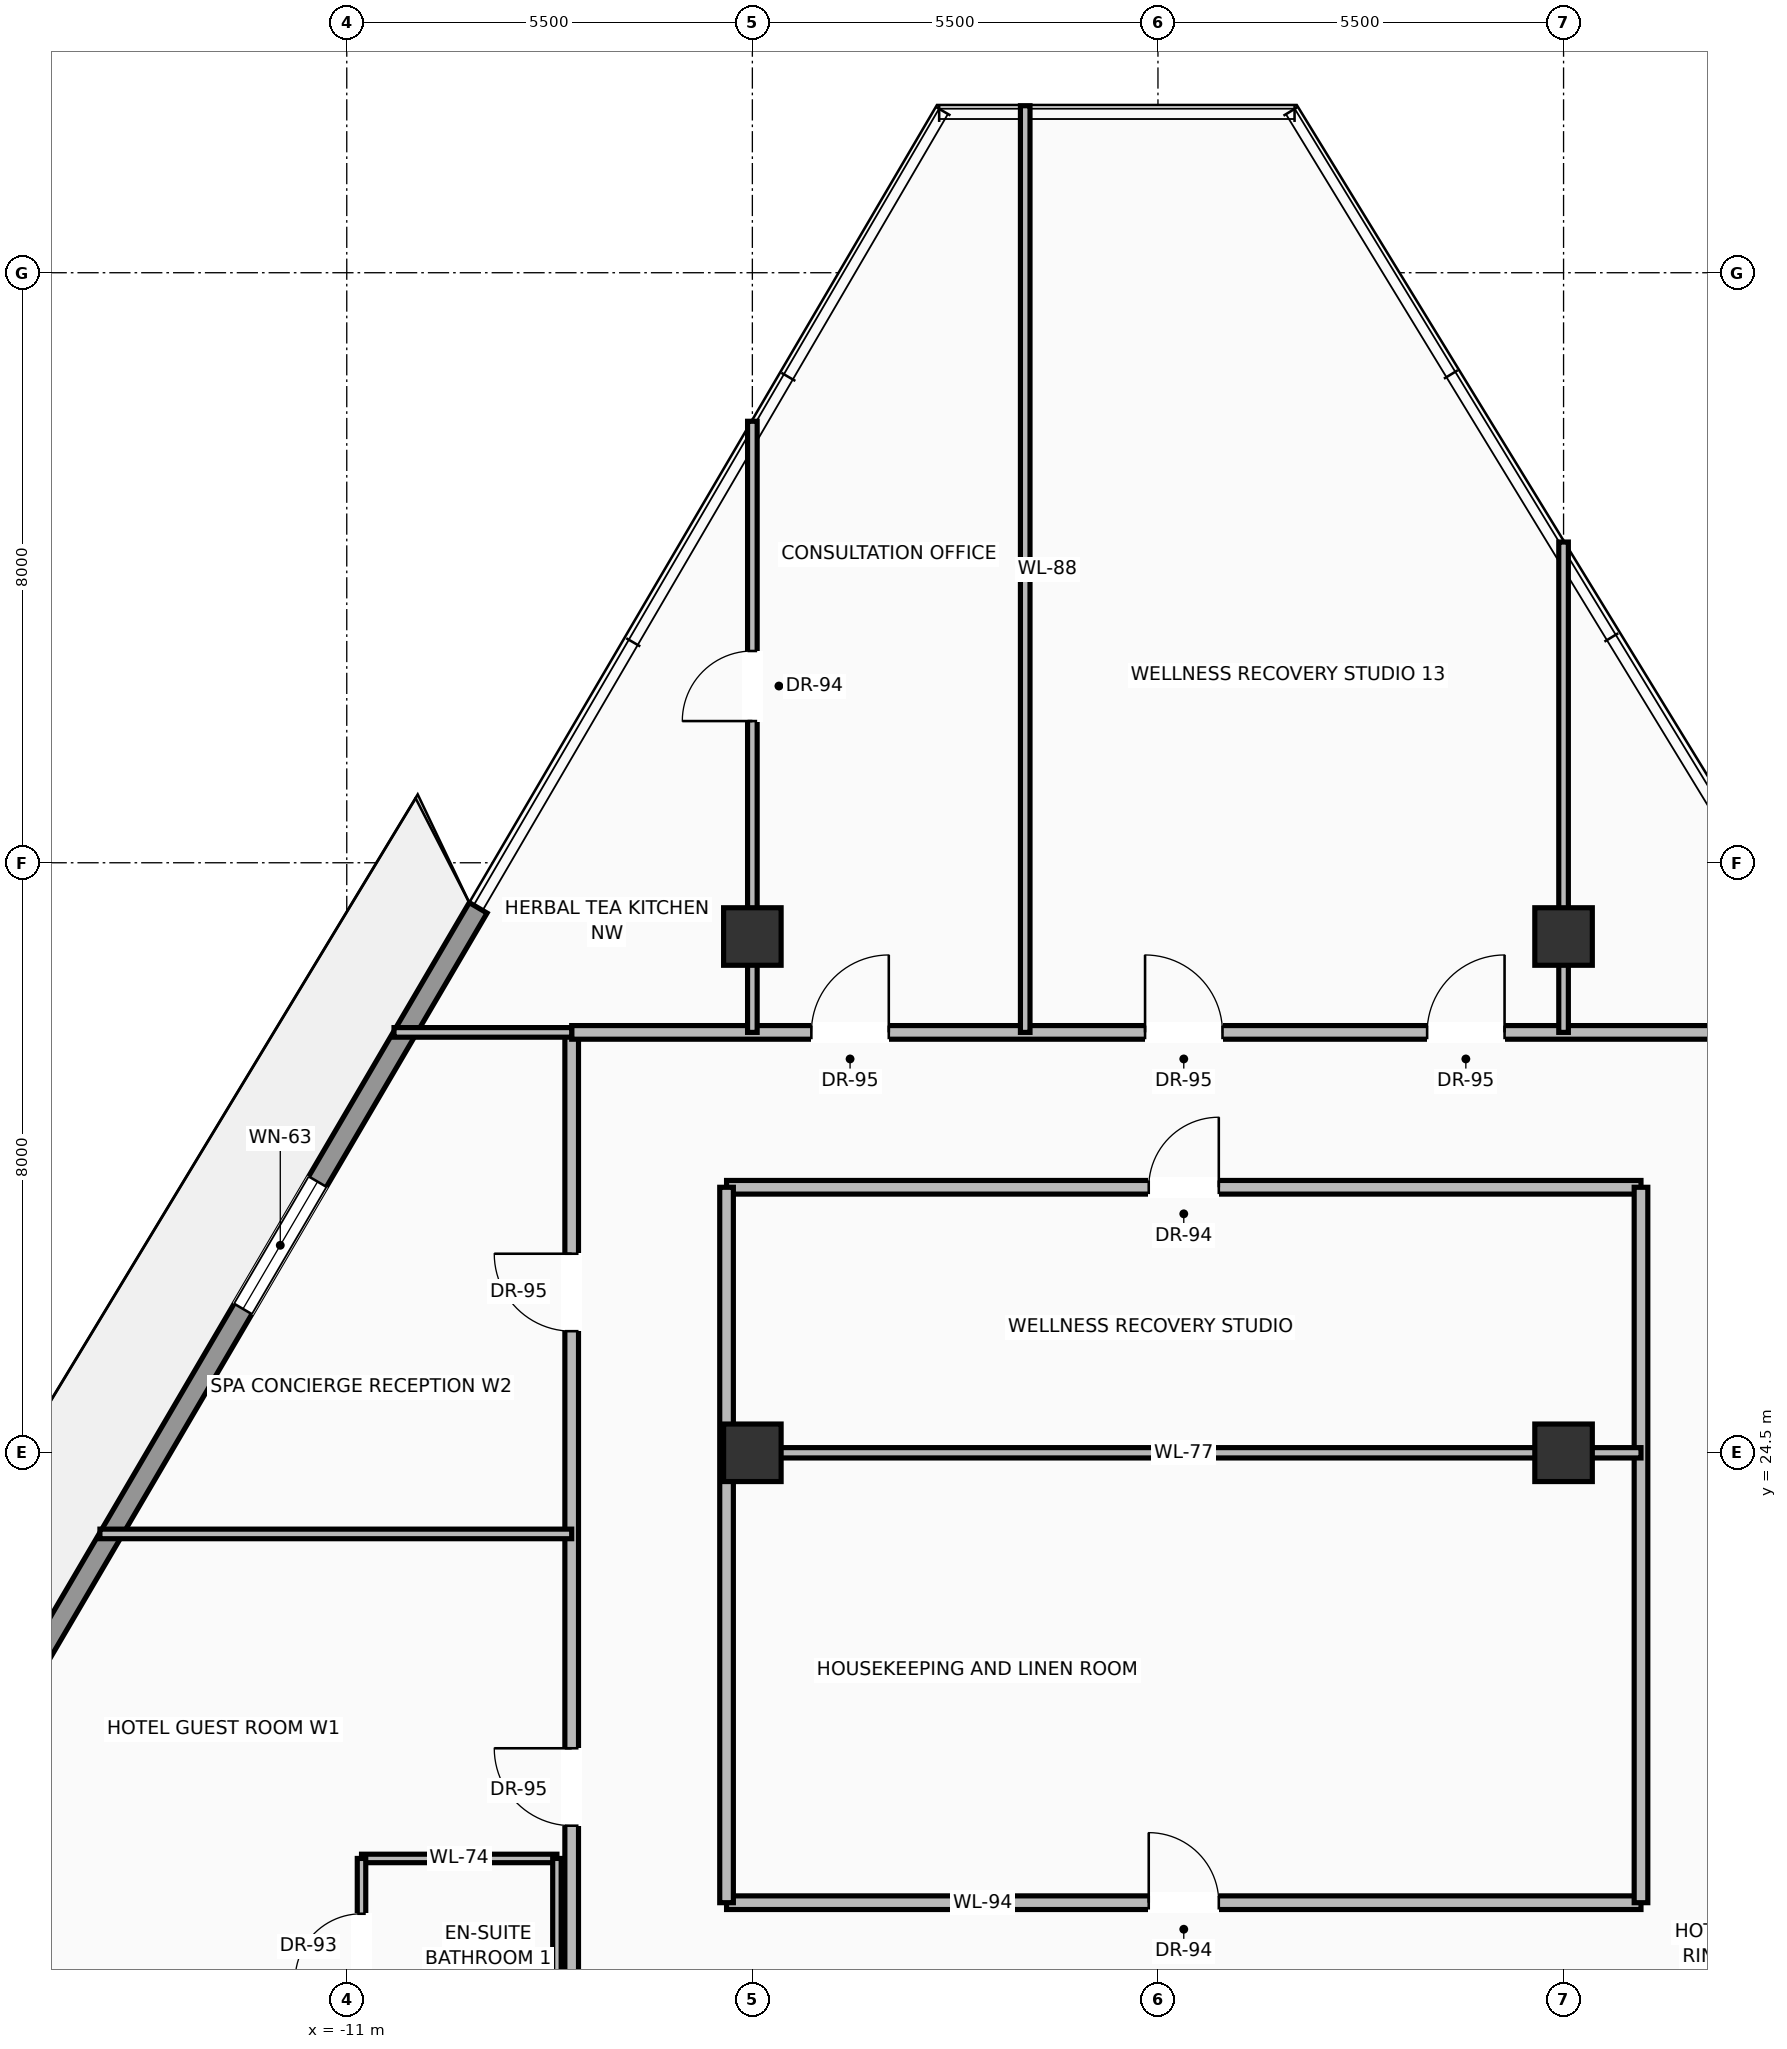
"""IFC4 building model, lengths in metres.
Left out: names, types, materials, properties, quantities, classifications, styles, units other than length and angle.
Written with IfcOpenShell. Run it as: python <this file> out.ifc"""

import sys

from ifc_helpers import new_model, si_unit, direction, frame, frame_2d, origin, origin_2d, place, context, subcontext, project, spatial, rectangle, extrude, source, transform, mapped, element, fill, save


model = new_model("IFC4")
c1 = context("Model", 3, precision=1e-05, world=origin(), true_north=direction((0.0, 1.0)))
c2 = subcontext(c1, "Body", "Model", "MODEL_VIEW")
j1 = project(units=[si_unit("LENGTHUNIT", "METRE"), si_unit("PLANEANGLEUNIT", "RADIAN")], contexts=[c1])
p1 = place(None, origin())
s1 = spatial("IfcSite", under=j1, at=p1, CompositionType="ELEMENT")
p2 = place(p1, origin())
s2 = spatial("IfcBuilding", under=s1, at=p2, CompositionType="ELEMENT")
p3 = place(p2, frame((0.0, 0.0, 247.6)))
s3 = spatial("IfcBuildingStorey", under=s2, at=p3, CompositionType="ELEMENT", Elevation=247.6)
m1 = source(origin(), c2, "Body", "SweptSolid", [
    extrude(rectangle(XDim=0.78, YDim=0.78, at=origin_2d()), origin(), (0.0, 0.0, 1.0), 3.45),
])
for number, where, z_axis, x_axis in (
    (1, (-5.5, 24.5, 0.0), (0.0, 0.0, 1.0), (1.0, 0.0, 0.0)),
    (2, (5.5, 24.5, 0.0), (0.0, 0.0, 1.0), (1.0, 0.0, 0.0)),
    (3, (-5.5, 31.5, 0.0), (0.0, 0.0, 1.0), (1.0, 0.0, 0.0)),
    (4, (5.5, 31.5, 0.0), (0.0, 0.0, 1.0), (1.0, 0.0, 0.0)),
):
    element("IfcColumn", number, at=place(p3, frame(where, z_axis=z_axis, x_axis=x_axis)), inside=s3, PredefinedType="COLUMN", context=c2, shape_type="MappedRepresentation", body=[
        mapped(m1, transform((0.0, 0.0, 0.0), scale=1.0)),
    ])
p4 = place(p3, frame((-19.184, 14.895, 0.0), z_axis=(0.0, 0.0, 1.0), x_axis=(0.505884551296, 0.862601194504, 0.0)))
e5 = element("IfcWall", 5, at=p4, inside=s3, PredefinedType="SOLIDWALL", context=c2, shape_type="SweptSolid", body=[
    extrude(rectangle(XDim=19.701, YDim=0.28, at=frame_2d((9.85, 0.0))), origin(), (0.0, 0.0, 1.0), 2.82),
])
p5 = place(p4, frame((4.728, 0.0, 0.0)))
e6 = element("IfcOpeningElement", 6, at=p5, cuts=e5, PredefinedType="OPENING", context=c2, shape_type="SweptSolid", body=[
    extrude(rectangle(XDim=1.6, YDim=2.35, at=frame_2d((0.8, 1.175))), frame((0.0, 0.15, 0.0), z_axis=(0.0, -1.0, 0.0), x_axis=(1.0, 0.0, 0.0)), (0.0, 0.0, 1.0), 0.3),
])
p6 = place(p4, frame((13.396, 0.0, 0.9)))
e7 = element("IfcOpeningElement", 7, at=p6, cuts=e5, PredefinedType="OPENING", context=c2, shape_type="SweptSolid", body=[
    extrude(rectangle(XDim=2.0, YDim=1.75, at=frame_2d((1.0, 0.875))), frame((0.0, 0.15, 0.0), z_axis=(0.0, -1.0, 0.0), x_axis=(1.0, 0.0, 0.0)), (0.0, 0.0, 1.0), 0.3),
])
p7 = place(p3, frame((-5.85, 18.4, 0.0), z_axis=(0.0, 0.0, 1.0), x_axis=(1.0, 0.0, 0.0)))
e8 = element("IfcWall", 8, at=p7, inside=s3, PredefinedType="PARTITIONING", context=c2, shape_type="SweptSolid", body=[
    extrude(rectangle(XDim=12.4, YDim=0.185, at=frame_2d((6.2, 0.0))), origin(), (0.0, 0.0, 1.0), 3.232),
])
p8 = place(p7, frame((5.725, 0.0, 0.0)))
e9 = element("IfcOpeningElement", 9, at=p8, cuts=e8, PredefinedType="OPENING", context=c2, shape_type="SweptSolid", body=[
    extrude(rectangle(XDim=0.95, YDim=2.2, at=frame_2d((0.475, 1.1))), frame((0.0, 0.103, 0.0), z_axis=(0.0, -1.0, 0.0), x_axis=(1.0, 0.0, 0.0)), (0.0, 0.0, 1.0), 0.205),
])
p9 = place(p3, frame((-5.85, 28.1, 0.0), z_axis=(0.0, 0.0, 1.0), x_axis=(1.0, 0.0, 0.0)))
e10 = element("IfcWall", 10, at=p9, inside=s3, PredefinedType="PARTITIONING", context=c2, shape_type="SweptSolid", body=[
    extrude(rectangle(XDim=12.4, YDim=0.185, at=frame_2d((6.2, 0.0))), origin(), (0.0, 0.0, 1.0), 2.885),
])
p10 = place(p9, frame((5.725, 0.0, 0.0)))
e11 = element("IfcOpeningElement", 11, at=p10, cuts=e10, PredefinedType="OPENING", context=c2, shape_type="SweptSolid", body=[
    extrude(rectangle(XDim=0.95, YDim=2.2, at=frame_2d((0.475, 1.1))), frame((0.0, 0.103, 0.0), z_axis=(0.0, -1.0, 0.0), x_axis=(1.0, 0.0, 0.0)), (0.0, 0.0, 1.0), 0.205),
])
for number, where, z_axis, x_axis in (
    (12, (-5.85, 18.4, 0.0), (0.0, 0.0, 1.0), (0.0, 1.0, 0.0)),
    (13, (6.55, 18.4, 0.0), (0.0, 0.0, 1.0), (0.0, 1.0, 0.0)),
):
    element("IfcWall", number, at=place(p3, frame(where, z_axis=z_axis, x_axis=x_axis)), inside=s3, PredefinedType="PARTITIONING", context=c2, shape_type="SweptSolid", body=[
        extrude(rectangle(XDim=9.7, YDim=0.185, at=frame_2d((4.85, 0.0))), origin(), (0.0, 0.0, 1.0), 3.232),
    ])
p11 = place(p3, frame((-7.95, 16.3, 0.0), z_axis=(0.0, 0.0, 1.0), x_axis=(0.0, 1.0, 0.0)))
e14 = element("IfcWall", 14, at=p11, inside=s3, PredefinedType="PARTITIONING", context=c2, shape_type="SweptSolid", body=[
    extrude(rectangle(XDim=13.9, YDim=0.185, at=frame_2d((6.95, 0.0))), origin(), (0.0, 0.0, 1.0), 3.232),
])
p12 = place(p11, frame((3.144, 0.0, 0.0)))
e15 = element("IfcOpeningElement", 15, at=p12, cuts=e14, PredefinedType="OPENING", context=c2, shape_type="SweptSolid", body=[
    extrude(rectangle(XDim=1.05, YDim=2.25, at=frame_2d((0.525, 1.125))), frame((0.0, 0.103, 0.0), z_axis=(0.0, -1.0, 0.0), x_axis=(1.0, 0.0, 0.0)), (0.0, 0.0, 1.0), 0.205),
])
p13 = place(p11, frame((9.849, 0.0, 0.0)))
e16 = element("IfcOpeningElement", 16, at=p13, cuts=e14, PredefinedType="OPENING", context=c2, shape_type="SweptSolid", body=[
    extrude(rectangle(XDim=1.05, YDim=2.25, at=frame_2d((0.525, 1.125))), frame((0.0, 0.103, 0.0), z_axis=(0.0, -1.0, 0.0), x_axis=(1.0, 0.0, 0.0)), (0.0, 0.0, 1.0), 0.205),
])
p14 = place(p3, frame((-7.95, 30.2, 0.0), z_axis=(0.0, 0.0, 1.0), x_axis=(1.0, 0.0, 0.0)))
e17 = element("IfcWall", 17, at=p14, inside=s3, PredefinedType="PARTITIONING", context=c2, shape_type="SweptSolid", body=[
    extrude(rectangle(XDim=16.6, YDim=0.185, at=frame_2d((8.3, 0.0))), origin(), (0.0, 0.0, 1.0), 3.232),
])
p15 = place(p14, frame((3.25, 0.0, 0.0)))
e18 = element("IfcOpeningElement", 18, at=p15, cuts=e17, PredefinedType="OPENING", context=c2, shape_type="SweptSolid", body=[
    extrude(rectangle(XDim=1.05, YDim=2.25, at=frame_2d((0.525, 1.125))), frame((0.0, 0.103, 0.0), z_axis=(0.0, -1.0, 0.0), x_axis=(1.0, 0.0, 0.0)), (0.0, 0.0, 1.0), 0.205),
])
p16 = place(p14, frame((7.775, 0.0, 0.0)))
e19 = element("IfcOpeningElement", 19, at=p16, cuts=e17, PredefinedType="OPENING", context=c2, shape_type="SweptSolid", body=[
    extrude(rectangle(XDim=1.05, YDim=2.25, at=frame_2d((0.525, 1.125))), frame((0.0, 0.103, 0.0), z_axis=(0.0, -1.0, 0.0), x_axis=(1.0, 0.0, 0.0)), (0.0, 0.0, 1.0), 0.205),
])
p17 = place(p14, frame((11.6, 0.0, 0.0)))
e20 = element("IfcOpeningElement", 20, at=p17, cuts=e17, PredefinedType="OPENING", context=c2, shape_type="SweptSolid", body=[
    extrude(rectangle(XDim=1.05, YDim=2.25, at=frame_2d((0.525, 1.125))), frame((0.0, 0.103, 0.0), z_axis=(0.0, -1.0, 0.0), x_axis=(1.0, 0.0, 0.0)), (0.0, 0.0, 1.0), 0.205),
])
p18 = place(p3, frame((-5.85, 24.5, 0.0), z_axis=(0.0, 0.0, 1.0), x_axis=(1.0, 0.0, 0.0)))
e21 = element("IfcWall", 21, at=p18, inside=s3, PredefinedType="PARTITIONING", context=c2, shape_type="SweptSolid", body=[
    extrude(rectangle(XDim=12.4, YDim=0.14, at=frame_2d((6.2, 0.0))), origin(), (0.0, 0.0, 1.0), 2.683),
])
p19 = place(p3, frame((-10.359, 30.2, 0.0), z_axis=(0.0, 0.0, 1.0), x_axis=(1.0, 0.0, 0.0)))
e22 = element("IfcWall", 22, at=p19, inside=s3, PredefinedType="PARTITIONING", context=c2, shape_type="SweptSolid", body=[
    extrude(rectangle(XDim=2.409, YDim=0.13, at=frame_2d((1.205, 0.0))), origin(), (0.0, 0.0, 1.0), 3.232),
])
p20 = place(p3, frame((-5.5, 30.2, 0.0), z_axis=(0.0, 0.0, 1.0), x_axis=(0.0, 1.0, 0.0)))
e23 = element("IfcWall", 23, at=p20, inside=s3, PredefinedType="PARTITIONING", context=c2, shape_type="SweptSolid", body=[
    extrude(rectangle(XDim=8.286, YDim=0.13, at=frame_2d((4.143, 0.0))), origin(), (0.0, 0.0, 1.0), 2.683),
])
p21 = place(p20, frame((4.221, 0.0, 0.0)))
e24 = element("IfcOpeningElement", 24, at=p21, cuts=e23, PredefinedType="OPENING", context=c2, shape_type="SweptSolid", body=[
    extrude(rectangle(XDim=0.95, YDim=2.2, at=frame_2d((0.475, 1.1))), frame((0.0, 0.075, 0.0), z_axis=(0.0, -1.0, 0.0), x_axis=(1.0, 0.0, 0.0)), (0.0, 0.0, 1.0), 0.15),
])
p22 = place(p3, frame((5.5, 30.2, 0.0), z_axis=(0.0, 0.0, 1.0), x_axis=(0.0, 1.0, 0.0)))
e25 = element("IfcWall", 25, at=p22, inside=s3, PredefinedType="PARTITIONING", context=c2, shape_type="SweptSolid", body=[
    extrude(rectangle(XDim=6.649, YDim=0.13, at=frame_2d((3.324, 0.0))), origin(), (0.0, 0.0, 1.0), 2.683),
])
p23 = place(p3, frame((-1.8, 30.2, 0.0), z_axis=(0.0, 0.0, 1.0), x_axis=(0.0, 1.0, 0.0)))
e26 = element("IfcWall", 26, at=p23, inside=s3, PredefinedType="PARTITIONING", context=c2, shape_type="SweptSolid", body=[
    extrude(rectangle(XDim=12.564, YDim=0.13, at=frame_2d((6.282, 0.0))), origin(), (0.0, 0.0, 1.0), 3.232),
])
p24 = place(p3, frame((-10.8, 19.0, 0.0), z_axis=(0.0, 0.0, 1.0), x_axis=(1.0, 0.0, 0.0)))
e27 = element("IfcWall", 27, at=p24, inside=s3, PredefinedType="PARTITIONING", context=c2, shape_type="SweptSolid", body=[
    extrude(rectangle(XDim=2.65, YDim=0.115, at=frame_2d((1.325, 0.0))), origin(), (0.0, 0.0, 1.0), 3.232),
])
p25 = place(p3, frame((-10.8, 16.6, 0.0), z_axis=(0.0, 0.0, 1.0), x_axis=(0.0, 1.0, 0.0)))
e28 = element("IfcWall", 28, at=p25, inside=s3, PredefinedType="PARTITIONING", context=c2, shape_type="SweptSolid", body=[
    extrude(rectangle(XDim=2.4, YDim=0.115, at=frame_2d((1.2, 0.0))), origin(), (0.0, 0.0, 1.0), 3.232),
])
p26 = place(p25, frame((0.75, 0.0, 0.0)))
e29 = element("IfcOpeningElement", 29, at=p26, cuts=e28, PredefinedType="OPENING", context=c2, shape_type="SweptSolid", body=[
    extrude(rectangle(XDim=0.9, YDim=2.15, at=frame_2d((0.45, 1.075))), frame((0.0, 0.067, 0.0), z_axis=(0.0, -1.0, 0.0), x_axis=(1.0, 0.0, 0.0)), (0.0, 0.0, 1.0), 0.135),
])
p27 = place(p3, frame((-8.15, 16.6, 0.0), z_axis=(0.0, 0.0, 1.0), x_axis=(0.0, 1.0, 0.0)))
e30 = element("IfcWall", 30, at=p27, inside=s3, PredefinedType="PARTITIONING", context=c2, shape_type="SweptSolid", body=[
    extrude(rectangle(XDim=2.4, YDim=0.115, at=frame_2d((1.2, 0.0))), origin(), (0.0, 0.0, 1.0), 3.232),
])
p28 = place(p3, frame((-14.347, 23.4, 0.0), z_axis=(0.0, 0.0, 1.0), x_axis=(1.0, 0.0, 0.0)))
e31 = element("IfcWall", 31, at=p28, inside=s3, PredefinedType="PARTITIONING", context=c2, shape_type="SweptSolid", body=[
    extrude(rectangle(XDim=6.397, YDim=0.13, at=frame_2d((3.199, 0.0))), origin(), (0.0, 0.0, 1.0), 3.232),
])
m2 = source(origin(), c2, "Body", "SweptSolid", [
    extrude(rectangle(XDim=2.0, YDim=1.75, at=frame_2d((1.0, 0.875))), frame((0.0, 0.03, 0.0), z_axis=(0.0, -1.0, 0.0), x_axis=(1.0, 0.0, 0.0)), (0.0, 0.0, 1.0), 0.06),
])
p29 = place(p6, origin())
e32 = element("IfcWindow", 32, at=p29, inside=s3, PartitioningType="SINGLE_PANEL", PredefinedType="WINDOW", context=c2, shape_type="MappedRepresentation", body=[
    mapped(m2, transform((0.0, 0.0, 0.0), scale=1.0)),
])
fill(e7, e32)
m3 = source(origin(), c2, "Body", "SweptSolid", [
    extrude(rectangle(XDim=0.95, YDim=2.2, at=frame_2d((0.475, 1.1))), frame((0.0, 0.025, 0.0), z_axis=(0.0, -1.0, 0.0), x_axis=(1.0, 0.0, 0.0)), (0.0, 0.0, 1.0), 0.05),
])
p30 = place(p8, origin())
e33 = element("IfcDoor", 33, at=p30, inside=s3, OperationType="SINGLE_SWING_LEFT", PredefinedType="DOOR", context=c2, shape_type="MappedRepresentation", body=[
    mapped(m3, transform((0.0, 0.0, 0.0), scale=1.0)),
])
fill(e9, e33)
p31 = place(p10, origin())
e34 = element("IfcDoor", 34, at=p31, inside=s3, OperationType="SINGLE_SWING_RIGHT", PredefinedType="DOOR", context=c2, shape_type="MappedRepresentation", body=[
    mapped(m3, transform((0.0, 0.0, 0.0), scale=1.0)),
])
fill(e11, e34)
m4 = source(origin(), c2, "Body", "SweptSolid", [
    extrude(rectangle(XDim=1.05, YDim=2.25, at=frame_2d((0.525, 1.125))), frame((0.0, 0.025, 0.0), z_axis=(0.0, -1.0, 0.0), x_axis=(1.0, 0.0, 0.0)), (0.0, 0.0, 1.0), 0.05),
])
p32 = place(p12, origin())
e35 = element("IfcDoor", 35, at=p32, inside=s3, OperationType="SINGLE_SWING_RIGHT", PredefinedType="DOOR", context=c2, shape_type="MappedRepresentation", body=[
    mapped(m4, transform((0.0, 0.0, 0.0), scale=1.0)),
])
fill(e15, e35)
m5 = source(origin(), c2, "Body", "SweptSolid", [
    extrude(rectangle(XDim=0.9, YDim=2.15, at=frame_2d((0.45, 1.075))), frame((0.0, 0.025, 0.0), z_axis=(0.0, -1.0, 0.0), x_axis=(1.0, 0.0, 0.0)), (0.0, 0.0, 1.0), 0.05),
])
p33 = place(p26, origin())
e36 = element("IfcDoor", 36, at=p33, inside=s3, OperationType="SINGLE_SWING_LEFT", PredefinedType="DOOR", context=c2, shape_type="MappedRepresentation", body=[
    mapped(m5, transform((0.0, 0.0, 0.0), scale=1.0)),
])
fill(e29, e36)
p34 = place(p13, origin())
e37 = element("IfcDoor", 37, at=p34, inside=s3, OperationType="SINGLE_SWING_RIGHT", PredefinedType="DOOR", context=c2, shape_type="MappedRepresentation", body=[
    mapped(m4, transform((0.0, 0.0, 0.0), scale=1.0)),
])
fill(e16, e37)
p35 = place(p15, origin())
e38 = element("IfcDoor", 38, at=p35, inside=s3, OperationType="SINGLE_SWING_RIGHT", PredefinedType="DOOR", context=c2, shape_type="MappedRepresentation", body=[
    mapped(m4, transform((0.0, 0.0, 0.0), scale=1.0)),
])
fill(e18, e38)
p36 = place(p16, origin())
e39 = element("IfcDoor", 39, at=p36, inside=s3, OperationType="SINGLE_SWING_LEFT", PredefinedType="DOOR", context=c2, shape_type="MappedRepresentation", body=[
    mapped(m4, transform((0.0, 0.0, 0.0), scale=1.0)),
])
fill(e19, e39)
p37 = place(p17, origin())
e40 = element("IfcDoor", 40, at=p37, inside=s3, OperationType="SINGLE_SWING_RIGHT", PredefinedType="DOOR", context=c2, shape_type="MappedRepresentation", body=[
    mapped(m4, transform((0.0, 0.0, 0.0), scale=1.0)),
])
fill(e20, e40)
p38 = place(p21, origin())
e41 = element("IfcDoor", 41, at=p38, inside=s3, OperationType="SINGLE_SWING_LEFT", PredefinedType="DOOR", context=c2, shape_type="MappedRepresentation", body=[
    mapped(m3, transform((0.0, 0.0, 0.0), scale=1.0)),
])
fill(e24, e41)
save(model, sys.argv[1])
